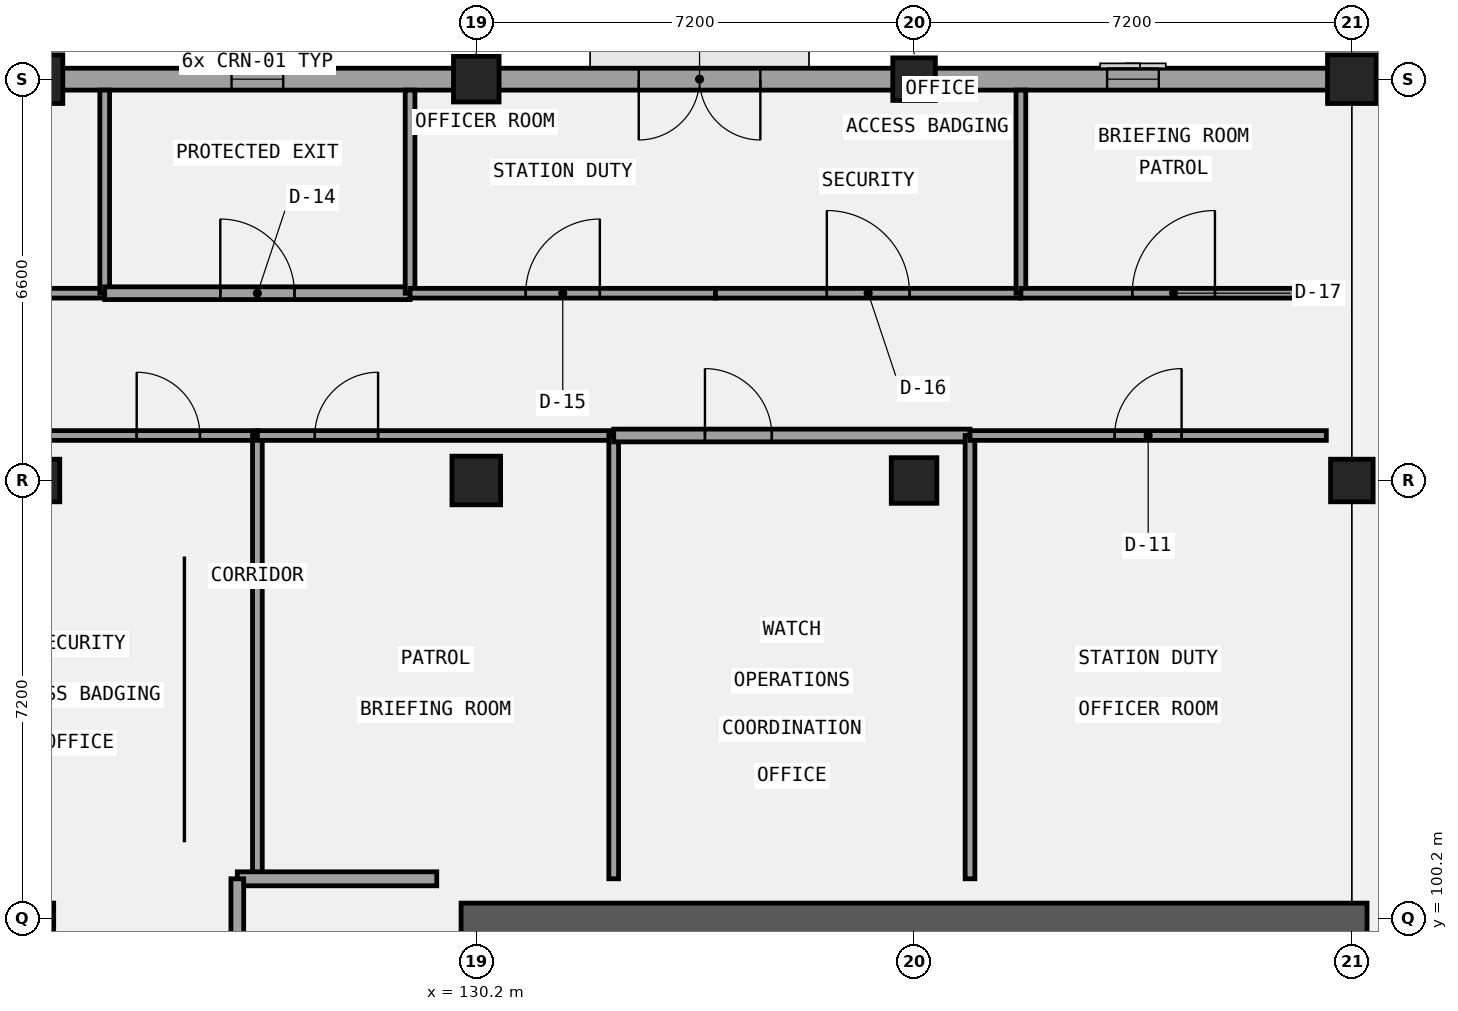
"""IFC4 building model, lengths in metres.
Left out: names, types, materials, properties, quantities, classifications, styles, units other than length and angle.
Written with IfcOpenShell. Run it as: python <this file> out.ifc"""

import sys

from ifc_helpers import new_model, si_unit, direction, frame, frame_2d, origin, origin_2d, place, context, subcontext, project, spatial, rectangle, extrude, element, fill, save


model = new_model("IFC4")
c1 = context("Model", 3, precision=1e-05, world=origin(), true_north=direction((0.0, 1.0)))
c2 = subcontext(c1, "Body", "Model", "MODEL_VIEW")
j1 = project(units=[si_unit("LENGTHUNIT", "METRE"), si_unit("PLANEANGLEUNIT", "RADIAN")], contexts=[c1])
p1 = place(None, origin())
s1 = spatial("IfcSite", under=j1, at=p1, CompositionType="ELEMENT")
p2 = place(p1, origin())
s2 = spatial("IfcBuilding", under=s1, at=p2, CompositionType="ELEMENT")
p3 = place(p2, origin())
s3 = spatial("IfcBuildingStorey", under=s2, at=p3, CompositionType="ELEMENT", Elevation=0.0)
p4 = place(p3, frame((108.35, 100.2, 0.0), z_axis=(0.0, 0.0, 1.0), x_axis=(1.0, 0.0, 0.0)))
e1 = element("IfcWall", 1, at=p4, inside=s3, PredefinedType="SHEAR", context=c2, shape_type="SweptSolid", body=[
    extrude(rectangle(XDim=14.9, YDim=0.5, at=frame_2d((7.45, 0.0))), origin(), (0.0, 0.0, 1.0), 5.4),
])
p5 = place(p3, frame((129.95, 100.2, 0.0), z_axis=(0.0, 0.0, 1.0), x_axis=(1.0, 0.0, 0.0)))
e2 = element("IfcWall", 2, at=p5, inside=s3, PredefinedType="SHEAR", context=c2, shape_type="SweptSolid", body=[
    extrude(rectangle(XDim=14.9, YDim=0.5, at=frame_2d((7.45, 0.0))), origin(), (0.0, 0.0, 1.0), 5.4),
])
p6 = place(p3, frame((123.0, 107.4, 0.0), z_axis=(0.0, 0.0, 1.0), x_axis=(1.0, 0.0, 0.0)))
e3 = element("IfcColumn", 3, at=p6, inside=s3, PredefinedType="COLUMN", context=c2, shape_type="SweptSolid", body=[
    extrude(rectangle(XDim=0.7, YDim=0.7, at=origin_2d()), origin(), (0.0, 0.0, 1.0), 5.4),
])
for number, where, z_axis, x_axis in (
    (4, (123.0, 114.0, 0.0), (0.0, 0.0, 1.0), (1.0, 0.0, 0.0)),
    (5, (130.2, 107.4, 0.0), (0.0, 0.0, 1.0), (1.0, 0.0, 0.0)),
):
    element("IfcColumn", number, at=place(p3, frame(where, z_axis=z_axis, x_axis=x_axis)), inside=s3, PredefinedType="COLUMN", context=c2, shape_type="SweptSolid", body=[
        extrude(rectangle(XDim=0.8, YDim=0.8, at=origin_2d()), origin(), (0.0, 0.0, 1.0), 5.4),
    ])
for number, where, z_axis, x_axis in (
    (6, (130.2, 114.0, 0.0), (0.0, 0.0, 1.0), (1.0, 0.0, 0.0)),
    (7, (137.4, 107.4, 0.0), (0.0, 0.0, 1.0), (1.0, 0.0, 0.0)),
):
    element("IfcColumn", number, at=place(p3, frame(where, z_axis=z_axis, x_axis=x_axis)), inside=s3, PredefinedType="COLUMN", context=c2, shape_type="SweptSolid", body=[
        extrude(rectangle(XDim=0.75, YDim=0.75, at=origin_2d()), origin(), (0.0, 0.0, 1.0), 5.4),
    ])
for number, where, z_axis, x_axis in (
    (8, (137.4, 114.0, 0.0), (0.0, 0.0, 1.0), (1.0, 0.0, 0.0)),
    (9, (144.6, 107.4, 0.0), (0.0, 0.0, 1.0), (1.0, 0.0, 0.0)),
):
    element("IfcColumn", number, at=place(p3, frame(where, z_axis=z_axis, x_axis=x_axis)), inside=s3, PredefinedType="COLUMN", context=c2, shape_type="SweptSolid", body=[
        extrude(rectangle(XDim=0.7, YDim=0.7, at=origin_2d()), origin(), (0.0, 0.0, 1.0), 5.4),
    ])
p7 = place(p3, frame((144.6, 114.0, 0.0), z_axis=(0.0, 0.0, 1.0), x_axis=(1.0, 0.0, 0.0)))
e10 = element("IfcColumn", 10, at=p7, inside=s3, PredefinedType="COLUMN", context=c2, shape_type="SweptSolid", body=[
    extrude(rectangle(XDim=0.8, YDim=0.8, at=origin_2d()), origin(), (0.0, 0.0, 1.0), 5.4),
])
p8 = place(p3, frame((166.38, 114.0, 0.0), z_axis=(0.0, 0.0, 1.0), x_axis=(-1.0, 0.0, 0.0)))
e11 = element("IfcWall", 11, at=p8, inside=s3, PredefinedType="SOLIDWALL", context=c2, shape_type="SweptSolid", body=[
    extrude(rectangle(XDim=21.96, YDim=0.36, at=frame_2d((10.98, 0.0))), origin(), (0.0, 0.0, 1.0), 4.37),
])
p9 = place(p8, frame((17.755, 0.0, 0.95)))
e12 = element("IfcOpeningElement", 12, at=p9, cuts=e11, PredefinedType="OPENING", context=c2, shape_type="SweptSolid", body=[
    extrude(rectangle(XDim=0.85, YDim=1.4, at=frame_2d((0.425, 0.7))), frame((0.0, 0.19, 0.0), z_axis=(0.0, -1.0, 0.0), x_axis=(1.0, 0.0, 0.0)), (0.0, 0.0, 1.0), 0.38),
])
p10 = place(p3, frame((144.78, 114.0, 0.0), z_axis=(0.0, 0.0, 1.0), x_axis=(-1.0, 0.0, 0.0)))
e13 = element("IfcWall", 13, at=p10, inside=s3, PredefinedType="SOLIDWALL", context=c2, shape_type="SweptSolid", body=[
    extrude(rectangle(XDim=36.36, YDim=0.36, at=frame_2d((18.18, 0.0))), origin(), (0.0, 0.0, 1.0), 4.37),
])
p11 = place(p10, frame((9.908, 0.0, 0.0)))
e14 = element("IfcOpeningElement", 14, at=p11, cuts=e13, PredefinedType="OPENING", context=c2, shape_type="SweptSolid", body=[
    extrude(rectangle(XDim=2.0, YDim=2.6, at=frame_2d((1.0, 1.3))), frame((0.0, 0.19, 0.0), z_axis=(0.0, -1.0, 0.0), x_axis=(1.0, 0.0, 0.0)), (0.0, 0.0, 1.0), 0.38),
])
p12 = place(p10, frame((32.155, 0.0, 0.95)))
e15 = element("IfcOpeningElement", 15, at=p12, cuts=e13, PredefinedType="OPENING", context=c2, shape_type="SweptSolid", body=[
    extrude(rectangle(XDim=0.85, YDim=1.4, at=frame_2d((0.425, 0.7))), frame((0.0, 0.19, 0.0), z_axis=(0.0, -1.0, 0.0), x_axis=(1.0, 0.0, 0.0)), (0.0, 0.0, 1.0), 0.38),
])
p13 = place(p10, frame((24.955, 0.0, 0.95)))
e16 = element("IfcOpeningElement", 16, at=p13, cuts=e13, PredefinedType="OPENING", context=c2, shape_type="SweptSolid", body=[
    extrude(rectangle(XDim=0.85, YDim=1.65, at=frame_2d((0.425, 0.825))), frame((0.0, 0.19, 0.0), z_axis=(0.0, -1.0, 0.0), x_axis=(1.0, 0.0, 0.0)), (0.0, 0.0, 1.0), 0.38),
])
p14 = place(p10, frame((17.755, 0.0, 0.95)))
e17 = element("IfcOpeningElement", 17, at=p14, cuts=e13, PredefinedType="OPENING", context=c2, shape_type="SweptSolid", body=[
    extrude(rectangle(XDim=0.85, YDim=1.9, at=frame_2d((0.425, 0.95))), frame((0.0, 0.19, 0.0), z_axis=(0.0, -1.0, 0.0), x_axis=(1.0, 0.0, 0.0)), (0.0, 0.0, 1.0), 0.38),
])
p15 = place(p10, frame((3.355, 0.0, 0.95)))
e18 = element("IfcOpeningElement", 18, at=p15, cuts=e13, PredefinedType="OPENING", context=c2, shape_type="SweptSolid", body=[
    extrude(rectangle(XDim=0.85, YDim=2.4, at=frame_2d((0.425, 1.2))), frame((0.0, 0.19, 0.0), z_axis=(0.0, -1.0, 0.0), x_axis=(1.0, 0.0, 0.0)), (0.0, 0.0, 1.0), 0.38),
])
p16 = place(p3, frame((120.74, 108.14, 0.0), z_axis=(0.0, 0.0, 1.0), x_axis=(1.0, 0.0, 0.0)))
e19 = element("IfcWall", 19, at=p16, inside=s3, PredefinedType="PARTITIONING", context=c2, shape_type="SweptSolid", body=[
    extrude(rectangle(XDim=5.86, YDim=0.16, at=frame_2d((2.93, 0.0))), origin(), (0.0, 0.0, 1.0), 5.12),
])
p17 = place(p16, frame((3.875, 0.0, 0.0)))
e20 = element("IfcOpeningElement", 20, at=p17, cuts=e19, PredefinedType="OPENING", context=c2, shape_type="SweptSolid", body=[
    extrude(rectangle(XDim=1.04, YDim=2.22, at=frame_2d((0.52, 1.11))), frame((0.0, 0.09, 0.0), z_axis=(0.0, -1.0, 0.0), x_axis=(1.0, 0.0, 0.0)), (0.0, 0.0, 1.0), 0.18),
])
p18 = place(p3, frame((126.6, 100.85, 0.0), z_axis=(0.0, 0.0, 1.0), x_axis=(0.0, 1.0, 0.0)))
e21 = element("IfcWall", 21, at=p18, inside=s3, PredefinedType="PARTITIONING", context=c2, shape_type="SweptSolid", body=[
    extrude(rectangle(XDim=7.29, YDim=0.16, at=frame_2d((3.645, 0.0))), origin(), (0.0, 0.0, 1.0), 5.12),
])
p19 = place(p3, frame((126.6, 108.14, 0.0), z_axis=(0.0, 0.0, 1.0), x_axis=(1.0, 0.0, 0.0)))
e22 = element("IfcWall", 22, at=p19, inside=s3, PredefinedType="PARTITIONING", context=c2, shape_type="SweptSolid", body=[
    extrude(rectangle(XDim=5.86, YDim=0.16, at=frame_2d((2.93, 0.0))), origin(), (0.0, 0.0, 1.0), 5.12),
])
p20 = place(p19, frame((0.945, 0.0, 0.0)))
e23 = element("IfcOpeningElement", 23, at=p20, cuts=e22, PredefinedType="OPENING", context=c2, shape_type="SweptSolid", body=[
    extrude(rectangle(XDim=1.04, YDim=2.35, at=frame_2d((0.52, 1.175))), frame((0.0, 0.09, 0.0), z_axis=(0.0, -1.0, 0.0), x_axis=(1.0, 0.0, 0.0)), (0.0, 0.0, 1.0), 0.18),
])
p21 = place(p3, frame((132.46, 100.85, 0.0), z_axis=(0.0, 0.0, 1.0), x_axis=(0.0, 1.0, 0.0)))
e24 = element("IfcWall", 24, at=p21, inside=s3, PredefinedType="PARTITIONING", context=c2, shape_type="SweptSolid", body=[
    extrude(rectangle(XDim=7.29, YDim=0.16, at=frame_2d((3.645, 0.0))), origin(), (0.0, 0.0, 1.0), 5.12),
])
p22 = place(p3, frame((132.46, 108.14, 0.0), z_axis=(0.0, 0.0, 1.0), x_axis=(1.0, 0.0, 0.0)))
e25 = element("IfcWall", 25, at=p22, inside=s3, PredefinedType="PARTITIONING", context=c2, shape_type="SweptSolid", body=[
    extrude(rectangle(XDim=5.86, YDim=0.21, at=frame_2d((2.93, 0.0))), origin(), (0.0, 0.0, 1.0), 5.12),
])
p23 = place(p22, frame((1.501, 0.0, 0.0)))
e26 = element("IfcOpeningElement", 26, at=p23, cuts=e25, PredefinedType="OPENING", context=c2, shape_type="SweptSolid", body=[
    extrude(rectangle(XDim=1.1, YDim=2.1, at=frame_2d((0.55, 1.05))), frame((0.0, 0.115, 0.0), z_axis=(0.0, -1.0, 0.0), x_axis=(1.0, 0.0, 0.0)), (0.0, 0.0, 1.0), 0.23),
])
p24 = place(p3, frame((138.32, 100.85, 0.0), z_axis=(0.0, 0.0, 1.0), x_axis=(0.0, 1.0, 0.0)))
e27 = element("IfcWall", 27, at=p24, inside=s3, PredefinedType="PARTITIONING", context=c2, shape_type="SweptSolid", body=[
    extrude(rectangle(XDim=7.29, YDim=0.16, at=frame_2d((3.645, 0.0))), origin(), (0.0, 0.0, 1.0), 5.12),
])
p25 = place(p3, frame((138.32, 108.14, 0.0), z_axis=(0.0, 0.0, 1.0), x_axis=(1.0, 0.0, 0.0)))
e28 = element("IfcWall", 28, at=p25, inside=s3, PredefinedType="PARTITIONING", context=c2, shape_type="SweptSolid", body=[
    extrude(rectangle(XDim=5.86, YDim=0.16, at=frame_2d((2.93, 0.0))), origin(), (0.0, 0.0, 1.0), 5.12),
])
p26 = place(p25, frame((2.38, 0.0, 0.0)))
e29 = element("IfcOpeningElement", 29, at=p26, cuts=e28, PredefinedType="OPENING", context=c2, shape_type="SweptSolid", body=[
    extrude(rectangle(XDim=1.1, YDim=2.22, at=frame_2d((0.55, 1.11))), frame((0.0, 0.09, 0.0), z_axis=(0.0, -1.0, 0.0), x_axis=(1.0, 0.0, 0.0)), (0.0, 0.0, 1.0), 0.18),
])
p27 = place(p3, frame((114.043, 110.48, 0.0), z_axis=(0.0, 0.0, 1.0), x_axis=(1.0, 0.0, 0.0)))
e30 = element("IfcWall", 30, at=p27, inside=s3, PredefinedType="PARTITIONING", context=c2, shape_type="SweptSolid", body=[
    extrude(rectangle(XDim=10.046, YDim=0.16, at=frame_2d((5.023, 0.0))), origin(), (0.0, 0.0, 1.0), 4.57),
])
p28 = place(p27, frame((4.413, 0.0, 0.0)))
e31 = element("IfcOpeningElement", 31, at=p28, cuts=e30, PredefinedType="OPENING", context=c2, shape_type="SweptSolid", body=[
    extrude(rectangle(XDim=1.22, YDim=2.1, at=frame_2d((0.61, 1.05))), frame((0.0, 0.09, 0.0), z_axis=(0.0, -1.0, 0.0), x_axis=(1.0, 0.0, 0.0)), (0.0, 0.0, 1.0), 0.18),
])
p29 = place(p3, frame((124.089, 110.48, 0.0), z_axis=(0.0, 0.0, 1.0), x_axis=(0.0, 1.0, 0.0)))
e32 = element("IfcWall", 32, at=p29, inside=s3, PredefinedType="PARTITIONING", context=c2, shape_type="SweptSolid", body=[
    extrude(rectangle(XDim=3.34, YDim=0.16, at=frame_2d((1.67, 0.0))), origin(), (0.0, 0.0, 1.0), 5.12),
])
p30 = place(p3, frame((124.089, 110.48, 0.0), z_axis=(0.0, 0.0, 1.0), x_axis=(1.0, 0.0, 0.0)))
e33 = element("IfcWall", 33, at=p30, inside=s3, PredefinedType="PARTITIONING", context=c2, shape_type="SweptSolid", body=[
    extrude(rectangle(XDim=5.022, YDim=0.21, at=frame_2d((2.511, 0.0))), origin(), (0.0, 0.0, 1.0), 4.57),
])
p31 = place(p30, frame((1.901, 0.0, 0.0)))
e34 = element("IfcOpeningElement", 34, at=p31, cuts=e33, PredefinedType="OPENING", context=c2, shape_type="SweptSolid", body=[
    extrude(rectangle(XDim=1.22, YDim=2.22, at=frame_2d((0.61, 1.11))), frame((0.0, 0.115, 0.0), z_axis=(0.0, -1.0, 0.0), x_axis=(1.0, 0.0, 0.0)), (0.0, 0.0, 1.0), 0.23),
])
p32 = place(p3, frame((129.111, 110.48, 0.0), z_axis=(0.0, 0.0, 1.0), x_axis=(0.0, 1.0, 0.0)))
e35 = element("IfcWall", 35, at=p32, inside=s3, PredefinedType="PARTITIONING", context=c2, shape_type="SweptSolid", body=[
    extrude(rectangle(XDim=3.34, YDim=0.16, at=frame_2d((1.67, 0.0))), origin(), (0.0, 0.0, 1.0), 5.12),
])
p33 = place(p3, frame((129.111, 110.48, 0.0), z_axis=(0.0, 0.0, 1.0), x_axis=(1.0, 0.0, 0.0)))
e36 = element("IfcWall", 36, at=p33, inside=s3, PredefinedType="PARTITIONING", context=c2, shape_type="SweptSolid", body=[
    extrude(rectangle(XDim=5.023, YDim=0.16, at=frame_2d((2.511, 0.0))), origin(), (0.0, 0.0, 1.0), 4.57),
])
p34 = place(p33, frame((1.902, 0.0, 0.0)))
e37 = element("IfcOpeningElement", 37, at=p34, cuts=e36, PredefinedType="OPENING", context=c2, shape_type="SweptSolid", body=[
    extrude(rectangle(XDim=1.22, YDim=2.35, at=frame_2d((0.61, 1.175))), frame((0.0, 0.09, 0.0), z_axis=(0.0, -1.0, 0.0), x_axis=(1.0, 0.0, 0.0)), (0.0, 0.0, 1.0), 0.18),
])
p35 = place(p3, frame((134.134, 110.48, 0.0), z_axis=(0.0, 0.0, 1.0), x_axis=(1.0, 0.0, 0.0)))
e38 = element("IfcWall", 38, at=p35, inside=s3, PredefinedType="PARTITIONING", context=c2, shape_type="SweptSolid", body=[
    extrude(rectangle(XDim=5.023, YDim=0.16, at=frame_2d((2.511, 0.0))), origin(), (0.0, 0.0, 1.0), 4.57),
])
p36 = place(p35, frame((1.832, 0.0, 0.0)))
e39 = element("IfcOpeningElement", 39, at=p36, cuts=e38, PredefinedType="OPENING", context=c2, shape_type="SweptSolid", body=[
    extrude(rectangle(XDim=1.36, YDim=2.1, at=frame_2d((0.68, 1.05))), frame((0.0, 0.09, 0.0), z_axis=(0.0, -1.0, 0.0), x_axis=(1.0, 0.0, 0.0)), (0.0, 0.0, 1.0), 0.18),
])
p37 = place(p3, frame((139.157, 110.48, 0.0), z_axis=(0.0, 0.0, 1.0), x_axis=(0.0, 1.0, 0.0)))
e40 = element("IfcWall", 40, at=p37, inside=s3, PredefinedType="PARTITIONING", context=c2, shape_type="SweptSolid", body=[
    extrude(rectangle(XDim=3.34, YDim=0.16, at=frame_2d((1.67, 0.0))), origin(), (0.0, 0.0, 1.0), 5.12),
])
p38 = place(p3, frame((139.157, 110.48, 0.0), z_axis=(0.0, 0.0, 1.0), x_axis=(1.0, 0.0, 0.0)))
e41 = element("IfcWall", 41, at=p38, inside=s3, PredefinedType="PARTITIONING", context=c2, shape_type="SweptSolid", body=[
    extrude(rectangle(XDim=5.023, YDim=0.16, at=frame_2d((2.511, 0.0))), origin(), (0.0, 0.0, 1.0), 4.57),
])
p39 = place(p38, frame((1.832, 0.0, 0.0)))
e42 = element("IfcOpeningElement", 42, at=p39, cuts=e41, PredefinedType="OPENING", context=c2, shape_type="SweptSolid", body=[
    extrude(rectangle(XDim=1.36, YDim=2.22, at=frame_2d((0.68, 1.11))), frame((0.0, 0.09, 0.0), z_axis=(0.0, -1.0, 0.0), x_axis=(1.0, 0.0, 0.0)), (0.0, 0.0, 1.0), 0.18),
])
p40 = place(p3, frame((126.27, 100.85, 0.0), z_axis=(0.0, 0.0, 1.0), x_axis=(1.0, 0.0, 0.0)))
e43 = element("IfcWall", 43, at=p40, inside=s3, PredefinedType="PARTITIONING", context=c2, shape_type="SweptSolid", body=[
    extrude(rectangle(XDim=3.28, YDim=0.23, at=frame_2d((1.64, 0.0))), origin(), (0.0, 0.0, 1.0), 5.12),
])
p41 = place(p3, frame((126.27, 92.85, 0.0), z_axis=(0.0, 0.0, 1.0), x_axis=(0.0, 1.0, 0.0)))
e44 = element("IfcWall", 44, at=p41, inside=s3, PredefinedType="PARTITIONING", context=c2, shape_type="SweptSolid", body=[
    extrude(rectangle(XDim=8.0, YDim=0.21, at=frame_2d((4.0, 0.0))), origin(), (0.0, 0.0, 1.0), 5.12),
])
p42 = place(p41, frame((3.14, 0.0, 0.0)))
e45 = element("IfcOpeningElement", 45, at=p42, cuts=e44, PredefinedType="OPENING", context=c2, shape_type="SweptSolid", body=[
    extrude(rectangle(XDim=1.72, YDim=2.22, at=frame_2d((0.86, 1.11))), frame((0.0, 0.115, 0.0), z_axis=(0.0, -1.0, 0.0), x_axis=(1.0, 0.0, 0.0)), (0.0, 0.0, 1.0), 0.23),
])
p43 = place(p11, frame((2.0, 0.0, 0.0), z_axis=(0.0, 0.0, 1.0), x_axis=(-1.0, 0.0, 0.0)))
e46 = element("IfcDoor", 46, at=p43, inside=s3, OperationType="DOUBLE_DOOR_SINGLE_SWING", PredefinedType="DOOR", context=c2, shape_type="SweptSolid", body=[
    extrude(rectangle(XDim=2.0, YDim=2.6, at=frame_2d((1.0, 1.3))), frame((0.0, 0.025, 0.0), z_axis=(0.0, -1.0, 0.0), x_axis=(1.0, 0.0, 0.0)), (0.0, 0.0, 1.0), 0.05),
])
fill(e14, e46)
p44 = place(p14, origin())
e47 = element("IfcWindow", 47, at=p44, inside=s3, PartitioningType="SINGLE_PANEL", PredefinedType="WINDOW", context=c2, shape_type="SweptSolid", body=[
    extrude(rectangle(XDim=0.85, YDim=1.9, at=frame_2d((0.425, 0.95))), frame((0.0, 0.03, 0.0), z_axis=(0.0, -1.0, 0.0), x_axis=(1.0, 0.0, 0.0)), (0.0, 0.0, 1.0), 0.06),
])
fill(e17, e47)
p45 = place(p15, origin())
e48 = element("IfcWindow", 48, at=p45, inside=s3, PartitioningType="SINGLE_PANEL", PredefinedType="WINDOW", context=c2, shape_type="SweptSolid", body=[
    extrude(rectangle(XDim=0.85, YDim=2.4, at=frame_2d((0.425, 1.2))), frame((0.0, 0.03, 0.0), z_axis=(0.0, -1.0, 0.0), x_axis=(1.0, 0.0, 0.0)), (0.0, 0.0, 1.0), 0.06),
])
fill(e18, e48)
p46 = place(p17, frame((1.04, 0.0, 0.0), z_axis=(0.0, 0.0, 1.0), x_axis=(-1.0, 0.0, 0.0)))
e49 = element("IfcDoor", 49, at=p46, inside=s3, OperationType="SINGLE_SWING_LEFT", PredefinedType="DOOR", context=c2, shape_type="SweptSolid", body=[
    extrude(rectangle(XDim=1.04, YDim=2.22, at=frame_2d((0.52, 1.11))), frame((0.0, 0.025, 0.0), z_axis=(0.0, -1.0, 0.0), x_axis=(1.0, 0.0, 0.0)), (0.0, 0.0, 1.0), 0.05),
])
fill(e20, e49)
p47 = place(p20, frame((1.04, 0.0, 0.0), z_axis=(0.0, 0.0, 1.0), x_axis=(-1.0, 0.0, 0.0)))
e50 = element("IfcDoor", 50, at=p47, inside=s3, OperationType="SINGLE_SWING_RIGHT", PredefinedType="DOOR", context=c2, shape_type="SweptSolid", body=[
    extrude(rectangle(XDim=1.04, YDim=2.35, at=frame_2d((0.52, 1.175))), frame((0.0, 0.025, 0.0), z_axis=(0.0, -1.0, 0.0), x_axis=(1.0, 0.0, 0.0)), (0.0, 0.0, 1.0), 0.05),
])
fill(e23, e50)
p48 = place(p23, frame((1.1, 0.0, 0.0), z_axis=(0.0, 0.0, 1.0), x_axis=(-1.0, 0.0, 0.0)))
e51 = element("IfcDoor", 51, at=p48, inside=s3, OperationType="SINGLE_SWING_LEFT", PredefinedType="DOOR", context=c2, shape_type="SweptSolid", body=[
    extrude(rectangle(XDim=1.1, YDim=2.1, at=frame_2d((0.55, 1.05))), frame((0.0, 0.025, 0.0), z_axis=(0.0, -1.0, 0.0), x_axis=(1.0, 0.0, 0.0)), (0.0, 0.0, 1.0), 0.05),
])
fill(e26, e51)
p49 = place(p26, frame((1.1, 0.0, 0.0), z_axis=(0.0, 0.0, 1.0), x_axis=(-1.0, 0.0, 0.0)))
e52 = element("IfcDoor", 52, at=p49, inside=s3, OperationType="SINGLE_SWING_RIGHT", PredefinedType="DOOR", context=c2, shape_type="SweptSolid", body=[
    extrude(rectangle(XDim=1.1, YDim=2.22, at=frame_2d((0.55, 1.11))), frame((0.0, 0.025, 0.0), z_axis=(0.0, -1.0, 0.0), x_axis=(1.0, 0.0, 0.0)), (0.0, 0.0, 1.0), 0.05),
])
fill(e29, e52)
p50 = place(p31, origin())
e53 = element("IfcDoor", 53, at=p50, inside=s3, OperationType="SINGLE_SWING_LEFT", PredefinedType="DOOR", context=c2, shape_type="SweptSolid", body=[
    extrude(rectangle(XDim=1.22, YDim=2.22, at=frame_2d((0.61, 1.11))), frame((0.0, 0.025, 0.0), z_axis=(0.0, -1.0, 0.0), x_axis=(1.0, 0.0, 0.0)), (0.0, 0.0, 1.0), 0.05),
])
fill(e34, e53)
p51 = place(p34, origin())
e54 = element("IfcDoor", 54, at=p51, inside=s3, OperationType="SINGLE_SWING_RIGHT", PredefinedType="DOOR", context=c2, shape_type="SweptSolid", body=[
    extrude(rectangle(XDim=1.22, YDim=2.35, at=frame_2d((0.61, 1.175))), frame((0.0, 0.025, 0.0), z_axis=(0.0, -1.0, 0.0), x_axis=(1.0, 0.0, 0.0)), (0.0, 0.0, 1.0), 0.05),
])
fill(e37, e54)
p52 = place(p36, origin())
e55 = element("IfcDoor", 55, at=p52, inside=s3, OperationType="SINGLE_SWING_LEFT", PredefinedType="DOOR", context=c2, shape_type="SweptSolid", body=[
    extrude(rectangle(XDim=1.36, YDim=2.1, at=frame_2d((0.68, 1.05))), frame((0.0, 0.025, 0.0), z_axis=(0.0, -1.0, 0.0), x_axis=(1.0, 0.0, 0.0)), (0.0, 0.0, 1.0), 0.05),
])
fill(e39, e55)
p53 = place(p39, origin())
e56 = element("IfcDoor", 56, at=p53, inside=s3, OperationType="SINGLE_SWING_RIGHT", PredefinedType="DOOR", context=c2, shape_type="SweptSolid", body=[
    extrude(rectangle(XDim=1.36, YDim=2.22, at=frame_2d((0.68, 1.11))), frame((0.0, 0.025, 0.0), z_axis=(0.0, -1.0, 0.0), x_axis=(1.0, 0.0, 0.0)), (0.0, 0.0, 1.0), 0.05),
])
fill(e42, e56)
save(model, sys.argv[1])
